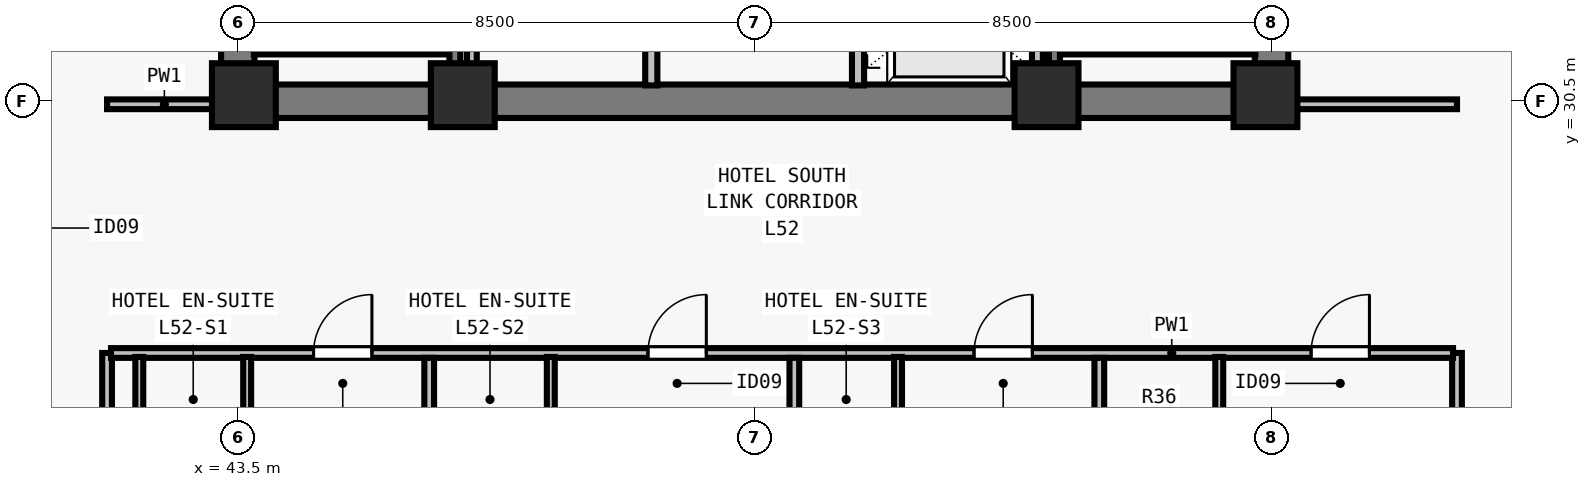
"""IFC4 building model, lengths in metres.
Left out: names, types, materials, properties, quantities, classifications, styles, units other than length and angle.
Written with IfcOpenShell. Run it as: python <this file> out.ifc"""

import sys

from ifc_helpers import new_model, si_unit, direction, frame, frame_2d, origin, origin_2d, place, context, subcontext, project, spatial, rectangle, extrude, element, fill, save


model = new_model("IFC4")
c1 = context("Model", 3, precision=1e-05, world=origin(), true_north=direction((0.0, 1.0)))
c2 = subcontext(c1, "Body", "Model", "MODEL_VIEW")
j1 = project(units=[si_unit("LENGTHUNIT", "METRE"), si_unit("PLANEANGLEUNIT", "RADIAN")], contexts=[c1])
p1 = place(None, origin())
s1 = spatial("IfcSite", under=j1, at=p1, CompositionType="ELEMENT")
p2 = place(p1, origin())
s2 = spatial("IfcBuilding", under=s1, at=p2, CompositionType="ELEMENT")
p3 = place(p2, frame((0.0, 0.0, 190.0)))
s3 = spatial("IfcBuildingStorey", under=s2, at=p3, CompositionType="ELEMENT", Elevation=190.0)
for number, where, z_axis, x_axis in (
    (1, (43.6, 30.6, 0.0), (0.0, 0.0, 1.0), (1.0, 0.0, 0.0)),
    (2, (47.2, 30.6, 0.0), (0.0, 0.0, 1.0), (1.0, 0.0, 0.0)),
    (3, (56.8, 30.6, 0.0), (0.0, 0.0, 1.0), (1.0, 0.0, 0.0)),
    (4, (60.4, 30.6, 0.0), (0.0, 0.0, 1.0), (1.0, 0.0, 0.0)),
):
    element("IfcColumn", number, at=place(p3, frame(where, z_axis=z_axis, x_axis=x_axis)), inside=s3, PredefinedType="COLUMN", context=c2, shape_type="SweptSolid", body=[
        extrude(rectangle(XDim=1.05, YDim=1.05, at=origin_2d()), origin(), (0.0, 0.0, 1.0), 3.5),
    ])
p4 = place(p3, frame((43.225, 30.5, 0.0), z_axis=(0.0, 0.0, 1.0), x_axis=(1.0, 0.0, 0.0)))
e5 = element("IfcWall", 5, at=p4, inside=s3, PredefinedType="SHEAR", context=c2, shape_type="SweptSolid", body=[
    extrude(rectangle(XDim=17.55, YDim=0.55, at=frame_2d((8.775, 0.0))), origin(), (0.0, 0.0, 1.0), 3.24),
])
for number, where, z_axis, x_axis in (
    (6, (43.5, 30.765, 0.0), (0.0, 0.0, 1.0), (0.0, 1.0, 0.0)),
    (7, (60.5, 30.765, 0.0), (0.0, 0.0, 1.0), (0.0, 1.0, 0.0)),
):
    element("IfcWall", number, at=place(p3, frame(where, z_axis=z_axis, x_axis=x_axis)), inside=s3, PredefinedType="SHEAR", context=c2, shape_type="SweptSolid", body=[
        extrude(rectangle(XDim=7.985, YDim=0.55, at=frame_2d((3.993, 0.0))), origin(), (0.0, 0.0, 1.0), 3.24),
    ])
p5 = place(p3, frame((50.3, 30.76, 0.0), z_axis=(0.0, 0.0, 1.0), x_axis=(0.0, 1.0, 0.0)))
e8 = element("IfcWall", 8, at=p5, inside=s3, PredefinedType="SOLIDWALL", context=c2, shape_type="SweptSolid", body=[
    extrude(rectangle(XDim=7.855, YDim=0.2, at=frame_2d((3.927, 0.0))), origin(), (0.0, 0.0, 1.0), 3.24),
])
p6 = place(p5, frame((1.34, 0.0, 0.0)))
e9 = element("IfcOpeningElement", 9, at=p6, cuts=e8, PredefinedType="OPENING", context=c2, shape_type="SweptSolid", body=[
    extrude(rectangle(XDim=0.9, YDim=2.12, at=frame_2d((0.45, 1.06))), frame((0.0, 0.11, 0.0), z_axis=(0.0, -1.0, 0.0), x_axis=(1.0, 0.0, 0.0)), (0.0, 0.0, 1.0), 0.22),
])
p7 = place(p5, frame((5.34, 0.0, 0.0)))
e10 = element("IfcOpeningElement", 10, at=p7, cuts=e8, PredefinedType="OPENING", context=c2, shape_type="SweptSolid", body=[
    extrude(rectangle(XDim=0.9, YDim=2.12, at=frame_2d((0.45, 1.06))), frame((0.0, 0.11, 0.0), z_axis=(0.0, -1.0, 0.0), x_axis=(1.0, 0.0, 0.0)), (0.0, 0.0, 1.0), 0.22),
])
p8 = place(p3, frame((53.7, 30.76, 0.0), z_axis=(0.0, 0.0, 1.0), x_axis=(0.0, 1.0, 0.0)))
e11 = element("IfcWall", 11, at=p8, inside=s3, PredefinedType="SOLIDWALL", context=c2, shape_type="SweptSolid", body=[
    extrude(rectangle(XDim=7.855, YDim=0.2, at=frame_2d((3.927, 0.0))), origin(), (0.0, 0.0, 1.0), 3.24),
])
p9 = place(p8, frame((0.79, 0.0, 0.0)))
e12 = element("IfcOpeningElement", 12, at=p9, cuts=e11, PredefinedType="OPENING", context=c2, shape_type="SweptSolid", body=[
    extrude(rectangle(XDim=1.1, YDim=2.2, at=frame_2d((0.55, 1.1))), frame((0.0, 0.11, 0.0), z_axis=(0.0, -1.0, 0.0), x_axis=(1.0, 0.0, 0.0)), (0.0, 0.0, 1.0), 0.22),
])
p10 = place(p8, frame((3.49, 0.0, 0.0)))
e13 = element("IfcOpeningElement", 13, at=p10, cuts=e11, PredefinedType="OPENING", context=c2, shape_type="SweptSolid", body=[
    extrude(rectangle(XDim=1.1, YDim=2.2, at=frame_2d((0.55, 1.1))), frame((0.0, 0.11, 0.0), z_axis=(0.0, -1.0, 0.0), x_axis=(1.0, 0.0, 0.0)), (0.0, 0.0, 1.0), 0.22),
])
p11 = place(p8, frame((6.19, 0.0, 0.0)))
e14 = element("IfcOpeningElement", 14, at=p11, cuts=e11, PredefinedType="OPENING", context=c2, shape_type="SweptSolid", body=[
    extrude(rectangle(XDim=1.1, YDim=2.2, at=frame_2d((0.55, 1.1))), frame((0.0, 0.11, 0.0), z_axis=(0.0, -1.0, 0.0), x_axis=(1.0, 0.0, 0.0)), (0.0, 0.0, 1.0), 0.22),
])
p12 = place(p3, frame((47.35, 30.76, 0.0), z_axis=(0.0, 0.0, 1.0), x_axis=(0.0, 1.0, 0.0)))
e15 = element("IfcWall", 15, at=p12, inside=s3, PredefinedType="PARTITIONING", context=c2, shape_type="SweptSolid", body=[
    extrude(rectangle(XDim=7.855, YDim=0.16, at=frame_2d((3.927, 0.0))), origin(), (0.0, 0.0, 1.0), 3.24),
])
p13 = place(p3, frame((56.65, 30.76, 0.0), z_axis=(0.0, 0.0, 1.0), x_axis=(0.0, 1.0, 0.0)))
e16 = element("IfcWall", 16, at=p13, inside=s3, PredefinedType="SOLIDWALL", context=c2, shape_type="SweptSolid", body=[
    extrude(rectangle(XDim=7.855, YDim=0.18, at=frame_2d((3.927, 0.0))), origin(), (0.0, 0.0, 1.0), 3.24),
])
p14 = place(p3, frame((41.35, 15.325, 0.0), z_axis=(0.0, 0.0, 1.0), x_axis=(0.0, 1.0, 0.0)))
e17 = element("IfcWall", 17, at=p14, inside=s3, PredefinedType="PARTITIONING", context=c2, shape_type="SweptSolid", body=[
    extrude(rectangle(XDim=11.035, YDim=0.16, at=frame_2d((5.518, 0.0))), origin(), (0.0, 0.0, 1.0), 3.24),
])
p15 = place(p3, frame((41.35, 30.45, 0.0), z_axis=(0.0, 0.0, 1.0), x_axis=(1.0, 0.0, 0.0)))
e18 = element("IfcWall", 18, at=p15, inside=s3, PredefinedType="PARTITIONING", context=c2, shape_type="SweptSolid", body=[
    extrude(rectangle(XDim=1.885, YDim=0.16, at=frame_2d((0.942, 0.0))), origin(), (0.0, 0.0, 1.0), 3.24),
])
p16 = place(p3, frame((63.55, 15.325, 0.0), z_axis=(0.0, 0.0, 1.0), x_axis=(0.0, 1.0, 0.0)))
e19 = element("IfcWall", 19, at=p16, inside=s3, PredefinedType="PARTITIONING", context=c2, shape_type="SweptSolid", body=[
    extrude(rectangle(XDim=11.035, YDim=0.16, at=frame_2d((5.518, 0.0))), origin(), (0.0, 0.0, 1.0), 3.24),
])
p17 = place(p3, frame((60.765, 30.45, 0.0), z_axis=(0.0, 0.0, 1.0), x_axis=(1.0, 0.0, 0.0)))
e20 = element("IfcWall", 20, at=p17, inside=s3, PredefinedType="PARTITIONING", context=c2, shape_type="SweptSolid", body=[
    extrude(rectangle(XDim=2.785, YDim=0.16, at=frame_2d((1.393, 0.0))), origin(), (0.0, 0.0, 1.0), 3.24),
])
p18 = place(p3, frame((41.415, 26.36, 0.0), z_axis=(0.0, 0.0, 1.0), x_axis=(1.0, 0.0, 0.0)))
e21 = element("IfcWall", 21, at=p18, inside=s3, PredefinedType="PARTITIONING", context=c2, shape_type="SweptSolid", body=[
    extrude(rectangle(XDim=22.07, YDim=0.16, at=frame_2d((11.035, 0.0))), origin(), (0.0, 0.0, 1.0), 3.24),
])
p19 = place(p18, frame((3.331, 0.0, 0.0)))
e22 = element("IfcOpeningElement", 22, at=p19, cuts=e21, PredefinedType="OPENING", context=c2, shape_type="SweptSolid", body=[
    extrude(rectangle(XDim=0.96, YDim=2.15, at=frame_2d((0.48, 1.075))), frame((0.0, 0.09, 0.0), z_axis=(0.0, -1.0, 0.0), x_axis=(1.0, 0.0, 0.0)), (0.0, 0.0, 1.0), 0.18),
])
p20 = place(p18, frame((8.83, 0.0, 0.0)))
e23 = element("IfcOpeningElement", 23, at=p20, cuts=e21, PredefinedType="OPENING", context=c2, shape_type="SweptSolid", body=[
    extrude(rectangle(XDim=0.96, YDim=2.15, at=frame_2d((0.48, 1.075))), frame((0.0, 0.09, 0.0), z_axis=(0.0, -1.0, 0.0), x_axis=(1.0, 0.0, 0.0)), (0.0, 0.0, 1.0), 0.18),
])
p21 = place(p18, frame((14.192, 0.0, 0.0)))
e24 = element("IfcOpeningElement", 24, at=p21, cuts=e21, PredefinedType="OPENING", context=c2, shape_type="SweptSolid", body=[
    extrude(rectangle(XDim=0.96, YDim=2.15, at=frame_2d((0.48, 1.075))), frame((0.0, 0.09, 0.0), z_axis=(0.0, -1.0, 0.0), x_axis=(1.0, 0.0, 0.0)), (0.0, 0.0, 1.0), 0.18),
])
p22 = place(p18, frame((19.735, 0.0, 0.0)))
e25 = element("IfcOpeningElement", 25, at=p22, cuts=e21, PredefinedType="OPENING", context=c2, shape_type="SweptSolid", body=[
    extrude(rectangle(XDim=0.96, YDim=2.15, at=frame_2d((0.48, 1.075))), frame((0.0, 0.09, 0.0), z_axis=(0.0, -1.0, 0.0), x_axis=(1.0, 0.0, 0.0)), (0.0, 0.0, 1.0), 0.18),
])
for number, where, z_axis, x_axis in (
    (26, (41.88, 23.98, 0.0), (0.0, 0.0, 1.0), (0.0, 1.0, 0.0)),
    (27, (43.654, 23.98, 0.0), (0.0, 0.0, 1.0), (0.0, 1.0, 0.0)),
):
    element("IfcWall", number, at=place(p3, frame(where, z_axis=z_axis, x_axis=x_axis)), inside=s3, PredefinedType="PLUMBINGWALL", context=c2, shape_type="SweptSolid", body=[
        extrude(rectangle(XDim=2.315, YDim=0.13, at=frame_2d((1.157, 0.0))), origin(), (0.0, 0.0, 1.0), 3.24),
    ])
p23 = place(p3, frame((46.647, 15.325, 0.0), z_axis=(0.0, 0.0, 1.0), x_axis=(0.0, 1.0, 0.0)))
e28 = element("IfcWall", 28, at=p23, inside=s3, PredefinedType="PARTITIONING", context=c2, shape_type="SweptSolid", body=[
    extrude(rectangle(XDim=10.955, YDim=0.16, at=frame_2d((5.478, 0.0))), origin(), (0.0, 0.0, 1.0), 3.24),
])
p24 = place(p3, frame((48.647, 23.98, 0.0), z_axis=(0.0, 0.0, 1.0), x_axis=(0.0, 1.0, 0.0)))
e29 = element("IfcWall", 29, at=p24, inside=s3, PredefinedType="PLUMBINGWALL", context=c2, shape_type="SweptSolid", body=[
    extrude(rectangle(XDim=2.315, YDim=0.13, at=frame_2d((1.157, 0.0))), origin(), (0.0, 0.0, 1.0), 3.24),
])
p25 = place(p3, frame((52.653, 15.325, 0.0), z_axis=(0.0, 0.0, 1.0), x_axis=(0.0, 1.0, 0.0)))
e30 = element("IfcWall", 30, at=p25, inside=s3, PredefinedType="PARTITIONING", context=c2, shape_type="SweptSolid", body=[
    extrude(rectangle(XDim=10.955, YDim=0.16, at=frame_2d((5.478, 0.0))), origin(), (0.0, 0.0, 1.0), 2.856),
])
p26 = place(p3, frame((54.358, 23.98, 0.0), z_axis=(0.0, 0.0, 1.0), x_axis=(0.0, 1.0, 0.0)))
e31 = element("IfcWall", 31, at=p26, inside=s3, PredefinedType="PLUMBINGWALL", context=c2, shape_type="SweptSolid", body=[
    extrude(rectangle(XDim=2.315, YDim=0.13, at=frame_2d((1.157, 0.0))), origin(), (0.0, 0.0, 1.0), 3.24),
])
p27 = place(p3, frame((57.667, 15.325, 0.0), z_axis=(0.0, 0.0, 1.0), x_axis=(0.0, 1.0, 0.0)))
e32 = element("IfcWall", 32, at=p27, inside=s3, PredefinedType="PARTITIONING", context=c2, shape_type="SweptSolid", body=[
    extrude(rectangle(XDim=10.955, YDim=0.16, at=frame_2d((5.478, 0.0))), origin(), (0.0, 0.0, 1.0), 3.24),
])
p28 = place(p3, frame((59.64, 23.98, 0.0), z_axis=(0.0, 0.0, 1.0), x_axis=(0.0, 1.0, 0.0)))
e33 = element("IfcWall", 33, at=p28, inside=s3, PredefinedType="PLUMBINGWALL", context=c2, shape_type="SweptSolid", body=[
    extrude(rectangle(XDim=2.315, YDim=0.13, at=frame_2d((1.157, 0.0))), origin(), (0.0, 0.0, 1.0), 3.24),
])
p29 = place(p3, frame((43.765, 31.36, 0.0), z_axis=(0.0, 0.0, 1.0), x_axis=(1.0, 0.0, 0.0)))
e34 = element("IfcWall", 34, at=p29, inside=s3, PredefinedType="SOLIDWALL", context=c2, shape_type="SweptSolid", body=[
    extrude(rectangle(XDim=3.23, YDim=0.18, at=frame_2d((1.615, 0.0))), origin(), (0.0, 0.0, 1.0), 3.24),
])
p30 = place(p3, frame((47.07, 38.78, 0.0), z_axis=(0.0, 0.0, 1.0), x_axis=(0.0, -1.0, 0.0)))
e35 = element("IfcWall", 35, at=p30, inside=s3, PredefinedType="SOLIDWALL", context=c2, shape_type="SweptSolid", body=[
    extrude(rectangle(XDim=8.017, YDim=0.18, at=frame_2d((4.009, 0.0))), origin(), (0.0, 0.0, 1.0), 3.24),
])
p31 = place(p3, frame((57.005, 31.36, 0.0), z_axis=(0.0, 0.0, 1.0), x_axis=(1.0, 0.0, 0.0)))
e36 = element("IfcWall", 36, at=p31, inside=s3, PredefinedType="SOLIDWALL", context=c2, shape_type="SweptSolid", body=[
    extrude(rectangle(XDim=3.23, YDim=0.18, at=frame_2d((1.615, 0.0))), origin(), (0.0, 0.0, 1.0), 3.24),
])
p32 = place(p3, frame((56.93, 38.78, 0.0), z_axis=(0.0, 0.0, 1.0), x_axis=(0.0, -1.0, 0.0)))
e37 = element("IfcWall", 37, at=p32, inside=s3, PredefinedType="SOLIDWALL", context=c2, shape_type="SweptSolid", body=[
    extrude(rectangle(XDim=8.017, YDim=0.18, at=frame_2d((4.009, 0.0))), origin(), (0.0, 0.0, 1.0), 3.24),
])
p33 = place(p19, origin())
e38 = element("IfcDoor", 38, at=p33, inside=s3, OperationType="SINGLE_SWING_RIGHT", PredefinedType="DOOR", context=c2, shape_type="SweptSolid", body=[
    extrude(rectangle(XDim=0.96, YDim=2.15, at=frame_2d((0.48, 1.075))), frame((0.0, 0.025, 0.0), z_axis=(0.0, -1.0, 0.0), x_axis=(1.0, 0.0, 0.0)), (0.0, 0.0, 1.0), 0.05),
])
fill(e22, e38)
p34 = place(p20, origin())
e39 = element("IfcDoor", 39, at=p34, inside=s3, OperationType="SINGLE_SWING_RIGHT", PredefinedType="DOOR", context=c2, shape_type="SweptSolid", body=[
    extrude(rectangle(XDim=0.96, YDim=2.15, at=frame_2d((0.48, 1.075))), frame((0.0, 0.025, 0.0), z_axis=(0.0, -1.0, 0.0), x_axis=(1.0, 0.0, 0.0)), (0.0, 0.0, 1.0), 0.05),
])
fill(e23, e39)
p35 = place(p21, origin())
e40 = element("IfcDoor", 40, at=p35, inside=s3, OperationType="SINGLE_SWING_RIGHT", PredefinedType="DOOR", context=c2, shape_type="SweptSolid", body=[
    extrude(rectangle(XDim=0.96, YDim=2.15, at=frame_2d((0.48, 1.075))), frame((0.0, 0.025, 0.0), z_axis=(0.0, -1.0, 0.0), x_axis=(1.0, 0.0, 0.0)), (0.0, 0.0, 1.0), 0.05),
])
fill(e24, e40)
p36 = place(p22, origin())
e41 = element("IfcDoor", 41, at=p36, inside=s3, OperationType="SINGLE_SWING_RIGHT", PredefinedType="DOOR", context=c2, shape_type="SweptSolid", body=[
    extrude(rectangle(XDim=0.96, YDim=2.15, at=frame_2d((0.48, 1.075))), frame((0.0, 0.025, 0.0), z_axis=(0.0, -1.0, 0.0), x_axis=(1.0, 0.0, 0.0)), (0.0, 0.0, 1.0), 0.05),
])
fill(e25, e41)
save(model, sys.argv[1])
